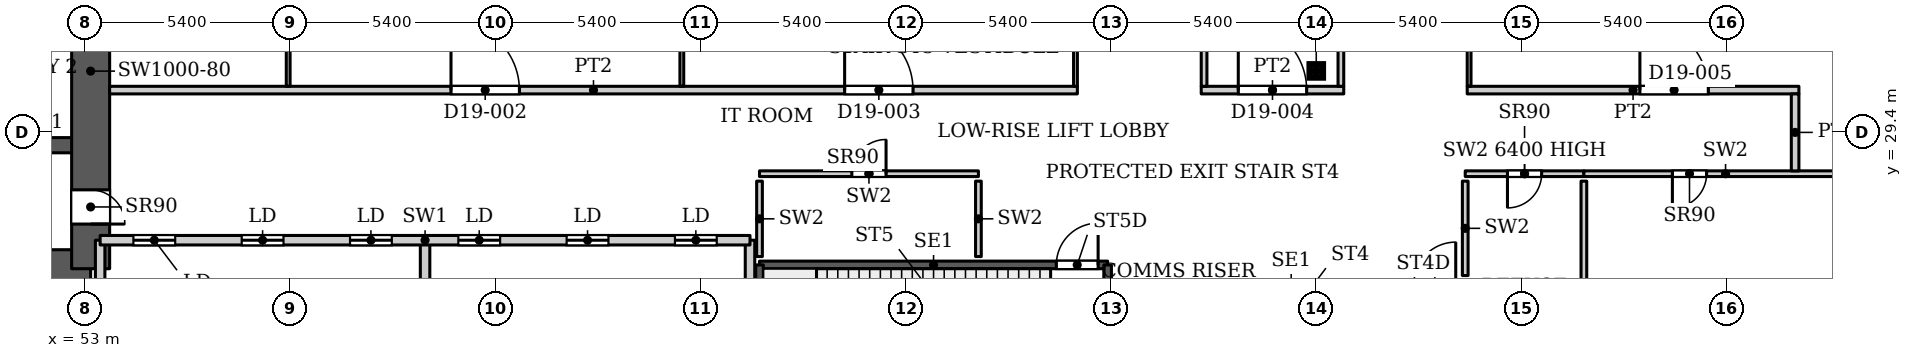
"""IFC4 building model, lengths in metres.
Left out: names, types, materials, properties, quantities, classifications, styles, units other than length and angle.
Written with IfcOpenShell. Run it as: python <this file> out.ifc"""

import sys

from ifc_helpers import new_model, si_unit, direction, frame, frame_2d, origin, origin_2d, place, context, subcontext, project, spatial, rectangle, hollow_rectangle, extrude, source, transform, mapped, element, fill, save


model = new_model("IFC4")
c1 = context("Model", 3, precision=1e-05, world=origin(), true_north=direction((0.0, 1.0)))
c2 = subcontext(c1, "Body", "Model", "MODEL_VIEW")
j1 = project(units=[si_unit("LENGTHUNIT", "METRE"), si_unit("PLANEANGLEUNIT", "RADIAN")], contexts=[c1])
p1 = place(None, origin())
s1 = spatial("IfcSite", under=j1, at=p1, CompositionType="ELEMENT")
p2 = place(p1, origin())
s2 = spatial("IfcBuilding", under=s1, at=p2, CompositionType="ELEMENT")
p3 = place(p2, frame((0.0, 0.0, 81.2)))
s3 = spatial("IfcBuildingStorey", under=s2, at=p3, CompositionType="ELEMENT", Elevation=81.2)
p4 = place(p3, frame((85.4, 31.005, 0.0), z_axis=(0.0, 0.0, 1.0), x_axis=(1.0, 0.0, 0.0)))
e1 = element("IfcColumn", 1, at=p4, inside=s3, PredefinedType="COLUMN", context=c2, shape_type="SweptSolid", body=[
    extrude(hollow_rectangle(XDim=0.356, YDim=0.356, WallThickness=0.016, InnerFilletRadius=0.016, OuterFilletRadius=0.032, at=origin_2d()), origin(), (0.0, 0.0, 1.0), 7.8),
])
p5 = place(p3, frame((34.75, 25.8, 0.0), z_axis=(0.0, 0.0, 1.0), x_axis=(1.0, 0.0, 0.0)))
e2 = element("IfcWall", 2, at=p5, inside=s3, PredefinedType="SHEAR", context=c2, shape_type="SweptSolid", body=[
    extrude(rectangle(XDim=18.4, YDim=1.0, at=frame_2d((9.2, 0.0))), origin(), (0.0, 0.0, 1.0), 7.8),
])
p6 = place(p3, frame((34.75, 29.05, 0.0), z_axis=(0.0, 0.0, 1.0), x_axis=(1.0, 0.0, 0.0)))
e3 = element("IfcWall", 3, at=p6, inside=s3, PredefinedType="SHEAR", context=c2, shape_type="SweptSolid", body=[
    extrude(rectangle(XDim=18.4, YDim=0.4, at=frame_2d((9.2, 0.0))), origin(), (0.0, 0.0, 1.0), 7.8),
])
p7 = place(p6, frame((15.125, 0.0, 0.0)))
e4 = element("IfcOpeningElement", 4, at=p7, cuts=e3, PredefinedType="OPENING", context=c2, shape_type="SweptSolid", body=[
    extrude(rectangle(XDim=1.1, YDim=2.2, at=frame_2d((0.55, 1.1))), frame((0.0, 0.21, 0.0), z_axis=(0.0, -1.0, 0.0), x_axis=(1.0, 0.0, 0.0)), (0.0, 0.0, 1.0), 0.42),
])
p8 = place(p3, frame((53.15, 25.8, 0.0), z_axis=(0.0, 0.0, 1.0), x_axis=(0.0, 1.0, 0.0)))
e5 = element("IfcWall", 5, at=p8, inside=s3, PredefinedType="SHEAR", context=c2, shape_type="SweptSolid", body=[
    extrude(rectangle(XDim=10.4, YDim=1.0, at=frame_2d((5.2, 0.0))), origin(), (0.0, 0.0, 1.0), 7.8),
])
p9 = place(p8, frame((1.175, 0.0, 0.0)))
e6 = element("IfcOpeningElement", 6, at=p9, cuts=e5, PredefinedType="OPENING", context=c2, shape_type="SweptSolid", body=[
    extrude(rectangle(XDim=0.9, YDim=2.2, at=frame_2d((0.45, 1.1))), frame((0.0, 0.51, 0.0), z_axis=(0.0, -1.0, 0.0), x_axis=(1.0, 0.0, 0.0)), (0.0, 0.0, 1.0), 1.02),
])
p10 = place(p8, frame((6.65, 0.0, 0.0)))
e7 = element("IfcOpeningElement", 7, at=p10, cuts=e5, PredefinedType="OPENING", context=c2, shape_type="SweptSolid", body=[
    extrude(rectangle(XDim=1.8, YDim=2.1, at=frame_2d((0.9, 1.05))), frame((0.0, 0.51, 0.0), z_axis=(0.0, -1.0, 0.0), x_axis=(1.0, 0.0, 0.0)), (0.0, 0.0, 1.0), 1.02),
])
p11 = place(p3, frame((70.75, 25.9, 0.0), z_axis=(0.0, 0.0, 1.0), x_axis=(1.0, 0.0, 0.0)))
e8 = element("IfcWall", 8, at=p11, inside=s3, PredefinedType="SHEAR", context=c2, shape_type="SweptSolid", body=[
    extrude(rectangle(XDim=9.16, YDim=0.2, at=frame_2d((4.58, 0.0))), origin(), (0.0, 0.0, 1.0), 7.8),
])
p12 = place(p11, frame((7.81, 0.0, 0.0)))
e9 = element("IfcOpeningElement", 9, at=p12, cuts=e8, PredefinedType="OPENING", context=c2, shape_type="SweptSolid", body=[
    extrude(rectangle(XDim=1.1, YDim=2.2, at=frame_2d((0.55, 1.1))), frame((0.0, 0.11, 0.0), z_axis=(0.0, -1.0, 0.0), x_axis=(1.0, 0.0, 0.0)), (0.0, 0.0, 1.0), 0.22),
])
for number, where, z_axis, x_axis in (
    (10, (70.75, 22.75, 0.0), (0.0, 0.0, 1.0), (0.0, 1.0, 0.0)),
    (11, (79.91, 22.75, 0.0), (0.0, 0.0, 1.0), (0.0, 1.0, 0.0)),
):
    element("IfcWall", number, at=place(p3, frame(where, z_axis=z_axis, x_axis=x_axis)), inside=s3, PredefinedType="SHEAR", context=c2, shape_type="SweptSolid", body=[
        extrude(rectangle(XDim=3.15, YDim=0.2, at=frame_2d((1.575, 0.0))), origin(), (0.0, 0.0, 1.0), 7.8),
    ])
for number, where, z_axis, x_axis in (
    (12, (53.4, 23.7, 0.0), (0.0, 0.0, 1.0), (0.0, 1.0, 0.0)),
    (13, (61.95, 23.7, 0.0), (0.0, 0.0, 1.0), (0.0, 1.0, 0.0)),
    (14, (70.5, 23.7, 0.0), (0.0, 0.0, 1.0), (0.0, 1.0, 0.0)),
):
    element("IfcWall", number, at=place(p3, frame(where, z_axis=z_axis, x_axis=x_axis)), inside=s3, PredefinedType="PARTITIONING", context=c2, shape_type="SweptSolid", body=[
        extrude(rectangle(XDim=2.85, YDim=0.25, at=frame_2d((1.425, 0.0))), origin(), (0.0, 0.0, 1.0), 7.8),
    ])
p13 = place(p3, frame((53.4, 26.55, 0.0), z_axis=(0.0, 0.0, 1.0), x_axis=(1.0, 0.0, 0.0)))
e15 = element("IfcWall", 15, at=p13, inside=s3, PredefinedType="PARTITIONING", context=c2, shape_type="SweptSolid", body=[
    extrude(rectangle(XDim=17.1, YDim=0.25, at=frame_2d((8.55, 0.0))), origin(), (0.0, 0.0, 1.0), 7.8),
])
p14 = place(p13, frame((0.875, 0.0, 0.0)))
e16 = element("IfcOpeningElement", 16, at=p14, cuts=e15, PredefinedType="OPENING", context=c2, shape_type="SweptSolid", body=[
    extrude(rectangle(XDim=1.1, YDim=2.2, at=frame_2d((0.55, 1.1))), frame((0.0, 0.135, 0.0), z_axis=(0.0, -1.0, 0.0), x_axis=(1.0, 0.0, 0.0)), (0.0, 0.0, 1.0), 0.27),
])
p15 = place(p13, frame((3.725, 0.0, 0.0)))
e17 = element("IfcOpeningElement", 17, at=p15, cuts=e15, PredefinedType="OPENING", context=c2, shape_type="SweptSolid", body=[
    extrude(rectangle(XDim=1.1, YDim=2.2, at=frame_2d((0.55, 1.1))), frame((0.0, 0.135, 0.0), z_axis=(0.0, -1.0, 0.0), x_axis=(1.0, 0.0, 0.0)), (0.0, 0.0, 1.0), 0.27),
])
p16 = place(p13, frame((6.575, 0.0, 0.0)))
e18 = element("IfcOpeningElement", 18, at=p16, cuts=e15, PredefinedType="OPENING", context=c2, shape_type="SweptSolid", body=[
    extrude(rectangle(XDim=1.1, YDim=2.2, at=frame_2d((0.55, 1.1))), frame((0.0, 0.135, 0.0), z_axis=(0.0, -1.0, 0.0), x_axis=(1.0, 0.0, 0.0)), (0.0, 0.0, 1.0), 0.27),
])
p17 = place(p13, frame((9.425, 0.0, 0.0)))
e19 = element("IfcOpeningElement", 19, at=p17, cuts=e15, PredefinedType="OPENING", context=c2, shape_type="SweptSolid", body=[
    extrude(rectangle(XDim=1.1, YDim=2.2, at=frame_2d((0.55, 1.1))), frame((0.0, 0.135, 0.0), z_axis=(0.0, -1.0, 0.0), x_axis=(1.0, 0.0, 0.0)), (0.0, 0.0, 1.0), 0.27),
])
p18 = place(p13, frame((12.275, 0.0, 0.0)))
e20 = element("IfcOpeningElement", 20, at=p18, cuts=e15, PredefinedType="OPENING", context=c2, shape_type="SweptSolid", body=[
    extrude(rectangle(XDim=1.1, YDim=2.2, at=frame_2d((0.55, 1.1))), frame((0.0, 0.135, 0.0), z_axis=(0.0, -1.0, 0.0), x_axis=(1.0, 0.0, 0.0)), (0.0, 0.0, 1.0), 0.27),
])
p19 = place(p13, frame((15.125, 0.0, 0.0)))
e21 = element("IfcOpeningElement", 21, at=p19, cuts=e15, PredefinedType="OPENING", context=c2, shape_type="SweptSolid", body=[
    extrude(rectangle(XDim=1.1, YDim=2.2, at=frame_2d((0.55, 1.1))), frame((0.0, 0.135, 0.0), z_axis=(0.0, -1.0, 0.0), x_axis=(1.0, 0.0, 0.0)), (0.0, 0.0, 1.0), 0.27),
])
p20 = place(p3, frame((70.75, 28.3, 0.0), z_axis=(0.0, 0.0, 1.0), x_axis=(1.0, 0.0, 0.0)))
e22 = element("IfcWall", 22, at=p20, inside=s3, PredefinedType="PARTITIONING", context=c2, shape_type="SweptSolid", body=[
    extrude(rectangle(XDim=5.76, YDim=0.15, at=frame_2d((2.88, 0.0))), origin(), (0.0, 0.0, 1.0), 7.8),
])
p21 = place(p20, frame((2.43, 0.0, 0.0)))
e23 = element("IfcOpeningElement", 23, at=p21, cuts=e22, PredefinedType="OPENING", context=c2, shape_type="SweptSolid", body=[
    extrude(rectangle(XDim=0.9, YDim=2.2, at=frame_2d((0.45, 1.1))), frame((0.0, 0.085, 0.0), z_axis=(0.0, -1.0, 0.0), x_axis=(1.0, 0.0, 0.0)), (0.0, 0.0, 1.0), 0.17),
])
for number, where, z_axis, x_axis in (
    (24, (70.75, 26.12, 0.0), (0.0, 0.0, 1.0), (0.0, 1.0, 0.0)),
    (25, (76.51, 26.12, 0.0), (0.0, 0.0, 1.0), (0.0, 1.0, 0.0)),
):
    element("IfcWall", number, at=place(p3, frame(where, z_axis=z_axis, x_axis=x_axis)), inside=s3, PredefinedType="PARTITIONING", context=c2, shape_type="SweptSolid", body=[
        extrude(rectangle(XDim=1.985, YDim=0.15, at=frame_2d((0.992, 0.0))), origin(), (0.0, 0.0, 1.0), 7.8),
    ])
p22 = place(p3, frame((89.32, 28.3, 0.0), z_axis=(0.0, 0.0, 1.0), x_axis=(1.0, 0.0, 0.0)))
e26 = element("IfcWall", 26, at=p22, inside=s3, PredefinedType="PARTITIONING", context=c2, shape_type="SweptSolid", body=[
    extrude(rectangle(XDim=3.122, YDim=0.15, at=frame_2d((1.561, 0.0))), origin(), (0.0, 0.0, 1.0), 6.4),
])
p23 = place(p22, frame((1.111, 0.0, 0.0)))
e27 = element("IfcOpeningElement", 27, at=p23, cuts=e26, PredefinedType="OPENING", context=c2, shape_type="SweptSolid", body=[
    extrude(rectangle(XDim=0.9, YDim=2.2, at=frame_2d((0.45, 1.1))), frame((0.0, 0.085, 0.0), z_axis=(0.0, -1.0, 0.0), x_axis=(1.0, 0.0, 0.0)), (0.0, 0.0, 1.0), 0.17),
])
p24 = place(p3, frame((89.32, 25.62, 0.0), z_axis=(0.0, 0.0, 1.0), x_axis=(0.0, 1.0, 0.0)))
e28 = element("IfcWall", 28, at=p24, inside=s3, PredefinedType="PARTITIONING", context=c2, shape_type="SweptSolid", body=[
    extrude(rectangle(XDim=2.485, YDim=0.15, at=frame_2d((1.242, 0.0))), origin(), (0.0, 0.0, 1.0), 7.8),
])
p25 = place(p3, frame((92.442, 21.406, 0.0), z_axis=(0.0, 0.0, 1.0), x_axis=(0.0, 1.0, 0.0)))
e29 = element("IfcWall", 29, at=p25, inside=s3, PredefinedType="PARTITIONING", context=c2, shape_type="SweptSolid", body=[
    extrude(rectangle(XDim=6.699, YDim=0.15, at=frame_2d((3.35, 0.0))), origin(), (0.0, 0.0, 1.0), 7.8),
])
p26 = place(p3, frame((92.442, 28.3, 0.0), z_axis=(0.0, 0.0, 1.0), x_axis=(1.0, 0.0, 0.0)))
e30 = element("IfcWall", 30, at=p26, inside=s3, PredefinedType="PARTITIONING", context=c2, shape_type="SweptSolid", body=[
    extrude(rectangle(XDim=7.456, YDim=0.15, at=frame_2d((3.728, 0.0))), origin(), (0.0, 0.0, 1.0), 7.8),
])
p27 = place(p26, frame((2.329, 0.0, 0.0)))
e31 = element("IfcOpeningElement", 31, at=p27, cuts=e30, PredefinedType="OPENING", context=c2, shape_type="SweptSolid", body=[
    extrude(rectangle(XDim=0.9, YDim=2.2, at=frame_2d((0.45, 1.1))), frame((0.0, 0.085, 0.0), z_axis=(0.0, -1.0, 0.0), x_axis=(1.0, 0.0, 0.0)), (0.0, 0.0, 1.0), 0.17),
])
p28 = place(p3, frame((53.649, 30.5, 0.0), z_axis=(0.0, 0.0, 1.0), x_axis=(1.0, 0.0, 0.0)))
e32 = element("IfcWall", 32, at=p28, inside=s3, PredefinedType="PARTITIONING", context=c2, shape_type="SweptSolid", body=[
    extrude(rectangle(XDim=25.465, YDim=0.2, at=frame_2d((12.732, 0.0))), origin(), (0.0, 0.0, 1.0), 7.5),
])
p29 = place(p28, frame((8.983, 0.0, 0.0)))
e33 = element("IfcOpeningElement", 33, at=p29, cuts=e32, PredefinedType="OPENING", context=c2, shape_type="SweptSolid", body=[
    extrude(rectangle(XDim=1.8, YDim=2.1, at=frame_2d((0.9, 1.05))), frame((0.0, 0.11, 0.0), z_axis=(0.0, -1.0, 0.0), x_axis=(1.0, 0.0, 0.0)), (0.0, 0.0, 1.0), 0.22),
])
p30 = place(p28, frame((19.341, 0.0, 0.0)))
e34 = element("IfcOpeningElement", 34, at=p30, cuts=e32, PredefinedType="OPENING", context=c2, shape_type="SweptSolid", body=[
    extrude(rectangle(XDim=1.8, YDim=2.1, at=frame_2d((0.9, 1.05))), frame((0.0, 0.11, 0.0), z_axis=(0.0, -1.0, 0.0), x_axis=(1.0, 0.0, 0.0)), (0.0, 0.0, 1.0), 0.22),
])
p31 = place(p3, frame((58.348, 30.6, 0.0), z_axis=(0.0, 0.0, 1.0), x_axis=(0.0, 1.0, 0.0)))
e35 = element("IfcWall", 35, at=p31, inside=s3, PredefinedType="PARTITIONING", context=c2, shape_type="SweptSolid", body=[
    extrude(rectangle(XDim=13.37, YDim=0.1, at=frame_2d((6.685, 0.0))), origin(), (0.0, 0.0, 1.0), 6.897),
])
for number, where, z_axis, x_axis in (
    (36, (68.706, 30.6, 0.0), (0.0, 0.0, 1.0), (0.0, 1.0, 0.0)),
    (37, (79.064, 30.6, 0.0), (0.0, 0.0, 1.0), (0.0, 1.0, 0.0)),
):
    element("IfcWall", number, at=place(p3, frame(where, z_axis=z_axis, x_axis=x_axis)), inside=s3, PredefinedType="PARTITIONING", context=c2, shape_type="SweptSolid", body=[
        extrude(rectangle(XDim=13.37, YDim=0.1, at=frame_2d((6.685, 0.0))), origin(), (0.0, 0.0, 1.0), 7.5),
    ])
p32 = place(p3, frame((82.373, 30.5, 0.0), z_axis=(0.0, 0.0, 1.0), x_axis=(1.0, 0.0, 0.0)))
e38 = element("IfcWall", 38, at=p32, inside=s3, PredefinedType="PARTITIONING", context=c2, shape_type="SweptSolid", body=[
    extrude(rectangle(XDim=3.75, YDim=0.2, at=frame_2d((1.875, 0.0))), origin(), (0.0, 0.0, 1.0), 7.5),
])
p33 = place(p32, frame((0.975, 0.0, 0.0)))
e39 = element("IfcOpeningElement", 39, at=p33, cuts=e38, PredefinedType="OPENING", context=c2, shape_type="SweptSolid", body=[
    extrude(rectangle(XDim=1.8, YDim=2.1, at=frame_2d((0.9, 1.05))), frame((0.0, 0.11, 0.0), z_axis=(0.0, -1.0, 0.0), x_axis=(1.0, 0.0, 0.0)), (0.0, 0.0, 1.0), 0.22),
])
for number, where, z_axis, x_axis in (
    (40, (82.448, 30.6, 0.0), (0.0, 0.0, 1.0), (0.0, 1.0, 0.0)),
    (41, (86.048, 30.6, 0.0), (0.0, 0.0, 1.0), (0.0, 1.0, 0.0)),
):
    element("IfcWall", number, at=place(p3, frame(where, z_axis=z_axis, x_axis=x_axis)), inside=s3, PredefinedType="PARTITIONING", context=c2, shape_type="SweptSolid", body=[
        extrude(rectangle(XDim=3.025, YDim=0.15, at=frame_2d((1.512, 0.0))), origin(), (0.0, 0.0, 1.0), 7.5),
    ])
p34 = place(p3, frame((89.372, 30.5, 0.0), z_axis=(0.0, 0.0, 1.0), x_axis=(1.0, 0.0, 0.0)))
e42 = element("IfcWall", 42, at=p34, inside=s3, PredefinedType="PARTITIONING", context=c2, shape_type="SweptSolid", body=[
    extrude(rectangle(XDim=8.728, YDim=0.2, at=frame_2d((4.364, 0.0))), origin(), (0.0, 0.0, 1.0), 7.5),
])
p35 = place(p34, frame((4.544, 0.0, 0.0)))
e43 = element("IfcOpeningElement", 43, at=p35, cuts=e42, PredefinedType="OPENING", context=c2, shape_type="SweptSolid", body=[
    extrude(rectangle(XDim=1.8, YDim=2.1, at=frame_2d((0.9, 1.05))), frame((0.0, 0.11, 0.0), z_axis=(0.0, -1.0, 0.0), x_axis=(1.0, 0.0, 0.0)), (0.0, 0.0, 1.0), 0.22),
])
p36 = place(p3, frame((89.422, 30.6, 0.0), z_axis=(0.0, 0.0, 1.0), x_axis=(0.0, 1.0, 0.0)))
e44 = element("IfcWall", 44, at=p36, inside=s3, PredefinedType="PARTITIONING", context=c2, shape_type="SweptSolid", body=[
    extrude(rectangle(XDim=13.37, YDim=0.1, at=frame_2d((6.685, 0.0))), origin(), (0.0, 0.0, 1.0), 7.5),
])
p37 = place(p3, frame((98.0, 28.374, 0.0), z_axis=(0.0, 0.0, 1.0), x_axis=(0.0, 1.0, 0.0)))
e45 = element("IfcWall", 45, at=p37, inside=s3, PredefinedType="PARTITIONING", context=c2, shape_type="SweptSolid", body=[
    extrude(rectangle(XDim=2.026, YDim=0.2, at=frame_2d((1.013, 0.0))), origin(), (0.0, 0.0, 1.0), 7.5),
])
m1 = source(origin(), c2, "Body", "SweptSolid", [
    extrude(rectangle(XDim=1.1, YDim=2.2, at=frame_2d((0.55, 1.1))), frame((0.0, 0.025, 0.0), z_axis=(0.0, -1.0, 0.0), x_axis=(1.0, 0.0, 0.0)), (0.0, 0.0, 1.0), 0.05),
])
p38 = place(p14, origin())
e46 = element("IfcDoor", 46, at=p38, inside=s3, OperationType="SLIDING_TO_LEFT", PredefinedType="DOOR", context=c2, shape_type="MappedRepresentation", body=[
    mapped(m1, transform((0.0, 0.0, 0.0), x_axis=(1.0, 0.0, 0.0), y_axis=(0.0, 1.0, 0.0), z_axis=(0.0, 0.0, 1.0), scale=1.0)),
])
fill(e16, e46)
p39 = place(p15, origin())
e47 = element("IfcDoor", 47, at=p39, inside=s3, OperationType="SLIDING_TO_LEFT", PredefinedType="DOOR", context=c2, shape_type="MappedRepresentation", body=[
    mapped(m1, transform((0.0, 0.0, 0.0), x_axis=(1.0, 0.0, 0.0), y_axis=(0.0, 1.0, 0.0), z_axis=(0.0, 0.0, 1.0), scale=1.0)),
])
fill(e17, e47)
p40 = place(p16, origin())
e48 = element("IfcDoor", 48, at=p40, inside=s3, OperationType="SLIDING_TO_LEFT", PredefinedType="DOOR", context=c2, shape_type="MappedRepresentation", body=[
    mapped(m1, transform((0.0, 0.0, 0.0), x_axis=(1.0, 0.0, 0.0), y_axis=(0.0, 1.0, 0.0), z_axis=(0.0, 0.0, 1.0), scale=1.0)),
])
fill(e18, e48)
p41 = place(p17, origin())
e49 = element("IfcDoor", 49, at=p41, inside=s3, OperationType="SLIDING_TO_LEFT", PredefinedType="DOOR", context=c2, shape_type="MappedRepresentation", body=[
    mapped(m1, transform((0.0, 0.0, 0.0), x_axis=(1.0, 0.0, 0.0), y_axis=(0.0, 1.0, 0.0), z_axis=(0.0, 0.0, 1.0), scale=1.0)),
])
fill(e19, e49)
p42 = place(p18, origin())
e50 = element("IfcDoor", 50, at=p42, inside=s3, OperationType="SLIDING_TO_LEFT", PredefinedType="DOOR", context=c2, shape_type="MappedRepresentation", body=[
    mapped(m1, transform((0.0, 0.0, 0.0), x_axis=(1.0, 0.0, 0.0), y_axis=(0.0, 1.0, 0.0), z_axis=(0.0, 0.0, 1.0), scale=1.0)),
])
fill(e20, e50)
p43 = place(p19, origin())
e51 = element("IfcDoor", 51, at=p43, inside=s3, OperationType="SLIDING_TO_LEFT", PredefinedType="DOOR", context=c2, shape_type="MappedRepresentation", body=[
    mapped(m1, transform((0.0, 0.0, 0.0), x_axis=(1.0, 0.0, 0.0), y_axis=(0.0, 1.0, 0.0), z_axis=(0.0, 0.0, 1.0), scale=1.0)),
])
fill(e21, e51)
m2 = source(origin(), c2, "Body", "SweptSolid", [
    extrude(rectangle(XDim=0.9, YDim=2.2, at=frame_2d((0.45, 1.1))), frame((0.0, 0.025, 0.0), z_axis=(0.0, -1.0, 0.0), x_axis=(1.0, 0.0, 0.0)), (0.0, 0.0, 1.0), 0.05),
])
p44 = place(p9, origin())
e52 = element("IfcDoor", 52, at=p44, inside=s3, OperationType="SINGLE_SWING_RIGHT", PredefinedType="DOOR", context=c2, shape_type="MappedRepresentation", body=[
    mapped(m2, transform((0.0, 0.0, 0.0), x_axis=(1.0, 0.0, 0.0), y_axis=(0.0, 1.0, 0.0), z_axis=(0.0, 0.0, 1.0), scale=1.0)),
])
fill(e6, e52)
p45 = place(p21, origin())
e53 = element("IfcDoor", 53, at=p45, inside=s3, OperationType="SINGLE_SWING_LEFT", PredefinedType="DOOR", context=c2, shape_type="MappedRepresentation", body=[
    mapped(m2, transform((0.0, 0.0, 0.0), x_axis=(1.0, 0.0, 0.0), y_axis=(0.0, 1.0, 0.0), z_axis=(0.0, 0.0, 1.0), scale=1.0)),
])
fill(e23, e53)
p46 = place(p23, origin())
e54 = element("IfcDoor", 54, at=p46, inside=s3, OperationType="SINGLE_SWING_RIGHT", PredefinedType="DOOR", context=c2, shape_type="MappedRepresentation", body=[
    mapped(m2, transform((0.0, 0.0, 0.0), x_axis=(1.0, 0.0, 0.0), y_axis=(0.0, 1.0, 0.0), z_axis=(0.0, 0.0, 1.0), scale=1.0)),
])
fill(e27, e54)
p47 = place(p27, origin())
e55 = element("IfcDoor", 55, at=p47, inside=s3, OperationType="SINGLE_SWING_RIGHT", PredefinedType="DOOR", context=c2, shape_type="MappedRepresentation", body=[
    mapped(m2, transform((0.0, 0.0, 0.0), x_axis=(1.0, 0.0, 0.0), y_axis=(0.0, 1.0, 0.0), z_axis=(0.0, 0.0, 1.0), scale=1.0)),
])
fill(e31, e55)
m3 = source(origin(), c2, "Body", "SweptSolid", [
    extrude(rectangle(XDim=1.1, YDim=2.2, at=frame_2d((0.55, 1.1))), frame((0.0, 0.025, 0.0), z_axis=(0.0, -1.0, 0.0), x_axis=(1.0, 0.0, 0.0)), (0.0, 0.0, 1.0), 0.05),
])
p48 = place(p12, origin())
e56 = element("IfcDoor", 56, at=p48, inside=s3, OperationType="SINGLE_SWING_LEFT", PredefinedType="DOOR", context=c2, shape_type="MappedRepresentation", body=[
    mapped(m3, transform((0.0, 0.0, 0.0), x_axis=(1.0, 0.0, 0.0), y_axis=(0.0, 1.0, 0.0), z_axis=(0.0, 0.0, 1.0), scale=1.0)),
])
fill(e9, e56)
m4 = source(origin(), c2, "Body", "SweptSolid", [
    extrude(rectangle(XDim=1.8, YDim=2.1, at=frame_2d((0.9, 1.05))), frame((0.0, 0.025, 0.0), z_axis=(0.0, -1.0, 0.0), x_axis=(1.0, 0.0, 0.0)), (0.0, 0.0, 1.0), 0.05),
])
p49 = place(p29, origin())
e57 = element("IfcDoor", 57, at=p49, inside=s3, OperationType="DOUBLE_DOOR_SINGLE_SWING", PredefinedType="DOOR", context=c2, shape_type="MappedRepresentation", body=[
    mapped(m4, transform((0.0, 0.0, 0.0), x_axis=(1.0, 0.0, 0.0), y_axis=(0.0, 1.0, 0.0), z_axis=(0.0, 0.0, 1.0), scale=1.0)),
])
fill(e33, e57)
p50 = place(p30, origin())
e58 = element("IfcDoor", 58, at=p50, inside=s3, OperationType="DOUBLE_DOOR_SINGLE_SWING", PredefinedType="DOOR", context=c2, shape_type="MappedRepresentation", body=[
    mapped(m4, transform((0.0, 0.0, 0.0), x_axis=(1.0, 0.0, 0.0), y_axis=(0.0, 1.0, 0.0), z_axis=(0.0, 0.0, 1.0), scale=1.0)),
])
fill(e34, e58)
p51 = place(p33, origin())
e59 = element("IfcDoor", 59, at=p51, inside=s3, OperationType="DOUBLE_DOOR_SINGLE_SWING", PredefinedType="DOOR", context=c2, shape_type="MappedRepresentation", body=[
    mapped(m4, transform((0.0, 0.0, 0.0), x_axis=(1.0, 0.0, 0.0), y_axis=(0.0, 1.0, 0.0), z_axis=(0.0, 0.0, 1.0), scale=1.0)),
])
fill(e39, e59)
p52 = place(p35, origin())
e60 = element("IfcDoor", 60, at=p52, inside=s3, OperationType="DOUBLE_DOOR_SINGLE_SWING", PredefinedType="DOOR", context=c2, shape_type="MappedRepresentation", body=[
    mapped(m4, transform((0.0, 0.0, 0.0), x_axis=(1.0, 0.0, 0.0), y_axis=(0.0, 1.0, 0.0), z_axis=(0.0, 0.0, 1.0), scale=1.0)),
])
fill(e43, e60)
save(model, sys.argv[1])
